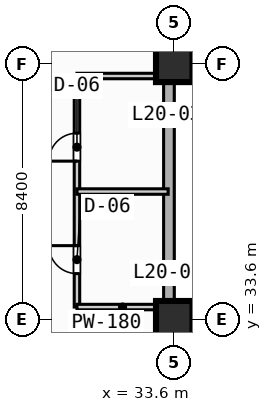
"""IFC4 building model, lengths in metres.
Left out: names, types, materials, properties, quantities, classifications, styles, units other than length and angle.
Written with IfcOpenShell. Run it as: python <this file> out.ifc"""

import sys

from ifc_helpers import new_model, si_unit, direction, frame, frame_2d, origin, origin_2d, place, context, subcontext, project, spatial, rectangle, extrude, element, fill, save


model = new_model("IFC4")
c1 = context("Model", 3, precision=1e-05, world=origin(), true_north=direction((0.0, 1.0)))
c2 = subcontext(c1, "Body", "Model", "MODEL_VIEW")
j1 = project(units=[si_unit("LENGTHUNIT", "METRE"), si_unit("PLANEANGLEUNIT", "RADIAN")], contexts=[c1])
p1 = place(None, origin())
s1 = spatial("IfcSite", under=j1, at=p1, CompositionType="ELEMENT")
p2 = place(p1, origin())
s2 = spatial("IfcBuilding", under=s1, at=p2, CompositionType="ELEMENT")
p3 = place(p2, frame((0.0, 0.0, 85.2)))
s3 = spatial("IfcBuildingStorey", under=s2, at=p3, CompositionType="ELEMENT", Elevation=85.2)
for number, where, z_axis, x_axis in (
    (1, (33.6, 33.6, 0.0), (0.0, 0.0, 1.0), (1.0, 0.0, 0.0)),
    (2, (33.6, 42.0, 0.0), (0.0, 0.0, 1.0), (1.0, 0.0, 0.0)),
):
    element("IfcColumn", number, at=place(p3, frame(where, z_axis=z_axis, x_axis=x_axis)), inside=s3, PredefinedType="COLUMN", context=c2, shape_type="SweptSolid", body=[
        extrude(rectangle(XDim=1.2, YDim=1.2, at=origin_2d()), origin(), (0.0, 0.0, 1.0), 4.4),
    ])
p4 = place(p3, frame((33.425, 89.225, 0.0), z_axis=(0.0, 0.0, 1.0), x_axis=(0.0, -1.0, 0.0)))
e3 = element("IfcWall", 3, at=p4, inside=s3, PredefinedType="STANDARD", context=c2, shape_type="SweptSolid", body=[
    extrude(rectangle(XDim=55.8, YDim=0.35, at=frame_2d((27.9, 0.0))), origin(), (0.0, 0.0, 1.0), 4.15),
])
p5 = place(p3, frame((33.425, 33.425, 0.0), z_axis=(0.0, 0.0, 1.0), x_axis=(1.0, 0.0, 0.0)))
e4 = element("IfcWall", 4, at=p5, inside=s3, PredefinedType="STANDARD", context=c2, shape_type="SweptSolid", body=[
    extrude(rectangle(XDim=39.0, YDim=0.35, at=frame_2d((19.5, 0.0))), origin(), (0.0, 0.0, 1.0), 4.15),
])
p6 = place(p5, frame((12.075, 0.0, 0.0)))
e5 = element("IfcOpeningElement", 5, at=p6, cuts=e4, PredefinedType="OPENING", context=c2, shape_type="SweptSolid", body=[
    extrude(rectangle(XDim=1.4, YDim=2.2, at=frame_2d((0.7, 1.1))), frame((0.0, 0.185, 0.0), z_axis=(0.0, -1.0, 0.0), x_axis=(1.0, 0.0, 0.0)), (0.0, 0.0, 1.0), 0.37),
])
p7 = place(p3, frame((30.4, 34.0, 0.0), z_axis=(0.0, 0.0, 1.0), x_axis=(0.0, 1.0, 0.0)))
e6 = element("IfcWall", 6, at=p7, inside=s3, PredefinedType="PLUMBINGWALL", context=c2, shape_type="SweptSolid", body=[
    extrude(rectangle(XDim=7.6, YDim=0.18, at=frame_2d((3.8, 0.0))), origin(), (0.0, 0.0, 1.0), 4.15),
])
p8 = place(p7, frame((1.1, 0.0, 0.0)))
e7 = element("IfcOpeningElement", 7, at=p8, cuts=e6, PredefinedType="OPENING", context=c2, shape_type="SweptSolid", body=[
    extrude(rectangle(XDim=0.92, YDim=2.1, at=frame_2d((0.46, 1.05))), frame((0.0, 0.1, 0.0), z_axis=(0.0, -1.0, 0.0), x_axis=(1.0, 0.0, 0.0)), (0.0, 0.0, 1.0), 0.2),
])
p9 = place(p7, frame((4.8, 0.0, 0.0)))
e8 = element("IfcOpeningElement", 8, at=p9, cuts=e6, PredefinedType="OPENING", context=c2, shape_type="SweptSolid", body=[
    extrude(rectangle(XDim=0.92, YDim=2.1, at=frame_2d((0.46, 1.05))), frame((0.0, 0.1, 0.0), z_axis=(0.0, -1.0, 0.0), x_axis=(1.0, 0.0, 0.0)), (0.0, 0.0, 1.0), 0.2),
])
for number, where, z_axis, x_axis in (
    (9, (30.4, 34.0, 0.0), (0.0, 0.0, 1.0), (1.0, 0.0, 0.0)),
    (10, (30.4, 37.8, 0.0), (0.0, 0.0, 1.0), (1.0, 0.0, 0.0)),
    (11, (30.4, 41.6, 0.0), (0.0, 0.0, 1.0), (1.0, 0.0, 0.0)),
):
    element("IfcWall", number, at=place(p3, frame(where, z_axis=z_axis, x_axis=x_axis)), inside=s3, PredefinedType="PLUMBINGWALL", context=c2, shape_type="SweptSolid", body=[
        extrude(rectangle(XDim=3.0, YDim=0.18, at=frame_2d((1.5, 0.0))), origin(), (0.0, 0.0, 1.0), 4.15),
    ])
p10 = place(p8, origin())
e12 = element("IfcDoor", 12, at=p10, inside=s3, OperationType="SINGLE_SWING_RIGHT", PredefinedType="DOOR", context=c2, shape_type="SweptSolid", body=[
    extrude(rectangle(XDim=0.92, YDim=2.1, at=frame_2d((0.46, 1.05))), frame((0.0, 0.025, 0.0), z_axis=(0.0, -1.0, 0.0), x_axis=(1.0, 0.0, 0.0)), (0.0, 0.0, 1.0), 0.05),
])
fill(e7, e12)
p11 = place(p9, origin())
e13 = element("IfcDoor", 13, at=p11, inside=s3, OperationType="SINGLE_SWING_LEFT", PredefinedType="DOOR", context=c2, shape_type="SweptSolid", body=[
    extrude(rectangle(XDim=0.92, YDim=2.1, at=frame_2d((0.46, 1.05))), frame((0.0, 0.025, 0.0), z_axis=(0.0, -1.0, 0.0), x_axis=(1.0, 0.0, 0.0)), (0.0, 0.0, 1.0), 0.05),
])
fill(e8, e13)
save(model, sys.argv[1])
